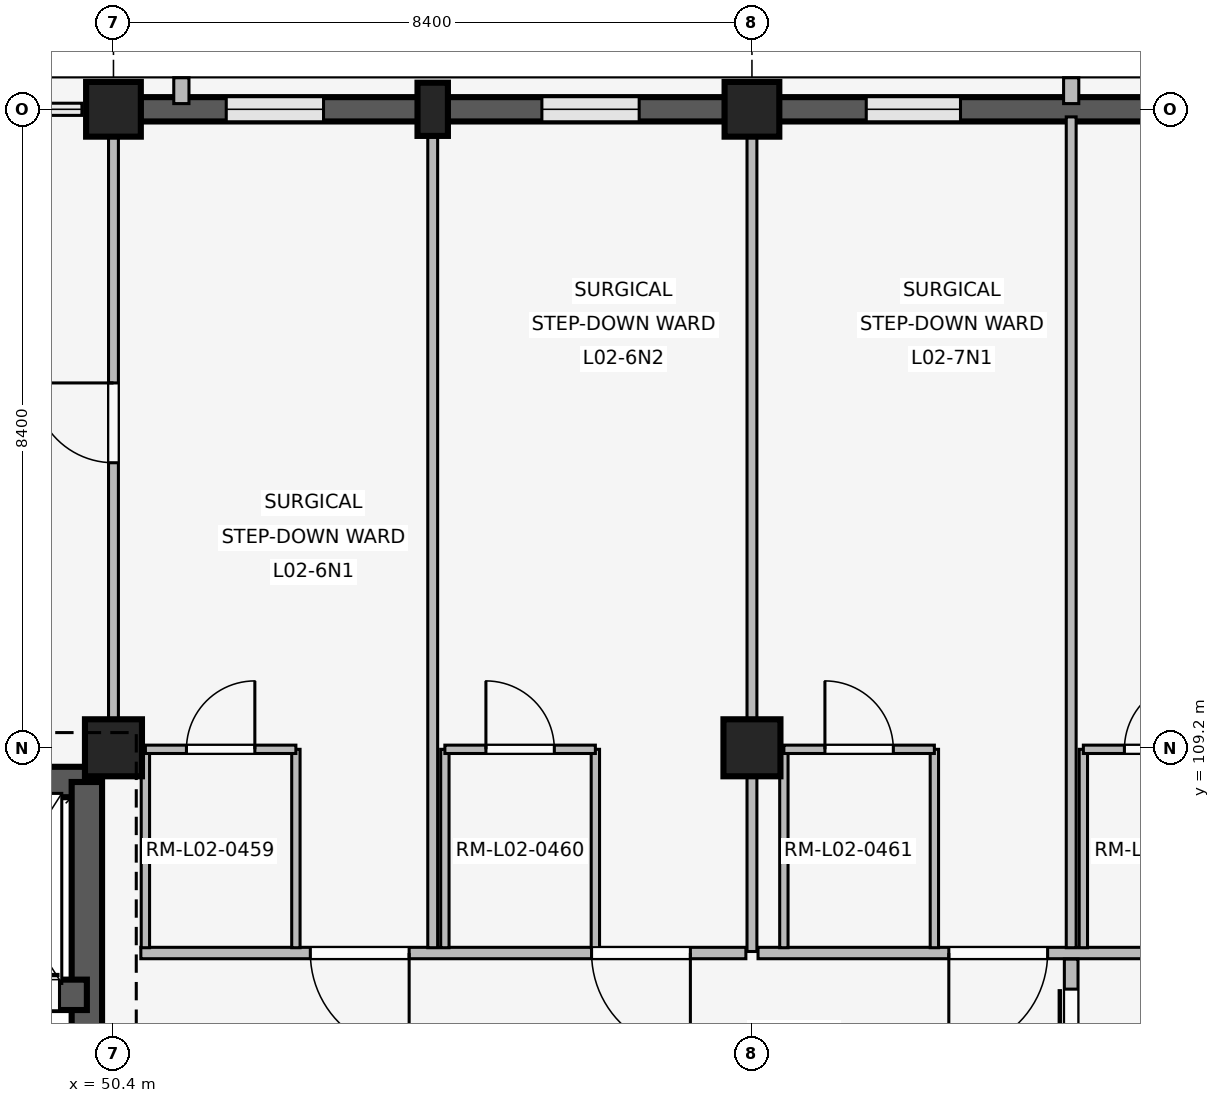
"""IFC4 building model, lengths in metres.
Left out: names, types, materials, properties, quantities, classifications, styles, units other than length and angle.
Written with IfcOpenShell. Run it as: python <this file> out.ifc"""

import sys

from ifc_helpers import new_model, si_unit, direction, frame, frame_2d, origin, origin_2d, place, context, subcontext, project, spatial, rectangle, extrude, element, fill, save


model = new_model("IFC4")
c1 = context("Model", 3, precision=1e-05, world=origin(), true_north=direction((0.0, 1.0)))
c2 = subcontext(c1, "Body", "Model", "MODEL_VIEW")
j1 = project(units=[si_unit("LENGTHUNIT", "METRE"), si_unit("PLANEANGLEUNIT", "RADIAN")], contexts=[c1])
p1 = place(None, origin())
s1 = spatial("IfcSite", under=j1, at=p1, CompositionType="ELEMENT")
p2 = place(p1, origin())
s2 = spatial("IfcBuilding", under=s1, at=p2, CompositionType="ELEMENT")
p3 = place(p2, frame((0.0, 0.0, 8.1)))
s3 = spatial("IfcBuildingStorey", under=s2, at=p3, CompositionType="ELEMENT", Elevation=8.1)
p4 = place(p3, frame((50.4, 109.2, 0.0), z_axis=(0.0, 0.0, 1.0), x_axis=(1.0, 0.0, 0.0)))
e1 = element("IfcColumn", 1, at=p4, inside=s3, PredefinedType="COLUMN", context=c2, shape_type="SweptSolid", body=[
    extrude(rectangle(XDim=0.75, YDim=0.75, at=origin_2d()), origin(), (0.0, 0.0, 1.0), 4.8),
])
p5 = place(p3, frame((50.4, 117.6, 0.0), z_axis=(0.0, 0.0, 1.0), x_axis=(1.0, 0.0, 0.0)))
e2 = element("IfcColumn", 2, at=p5, inside=s3, PredefinedType="COLUMN", context=c2, shape_type="SweptSolid", body=[
    extrude(rectangle(XDim=0.72, YDim=0.72, at=origin_2d()), origin(), (0.0, 0.0, 1.0), 4.8),
])
p6 = place(p3, frame((58.8, 109.2, 0.0), z_axis=(0.0, 0.0, 1.0), x_axis=(1.0, 0.0, 0.0)))
e3 = element("IfcColumn", 3, at=p6, inside=s3, PredefinedType="COLUMN", context=c2, shape_type="SweptSolid", body=[
    extrude(rectangle(XDim=0.75, YDim=0.75, at=origin_2d()), origin(), (0.0, 0.0, 1.0), 4.8),
])
p7 = place(p3, frame((58.8, 117.6, 0.0), z_axis=(0.0, 0.0, 1.0), x_axis=(1.0, 0.0, 0.0)))
e4 = element("IfcColumn", 4, at=p7, inside=s3, PredefinedType="COLUMN", context=c2, shape_type="SweptSolid", body=[
    extrude(rectangle(XDim=0.72, YDim=0.72, at=origin_2d()), origin(), (0.0, 0.0, 1.0), 4.8),
])
p8 = place(p3, frame((54.6, 117.6, 0.0), z_axis=(0.0, 0.0, 1.0), x_axis=(1.0, 0.0, 0.0)))
e5 = element("IfcColumn", 5, at=p8, inside=s3, PredefinedType="PILASTER", context=c2, shape_type="SweptSolid", body=[
    extrude(rectangle(XDim=0.4, YDim=0.7, at=origin_2d()), origin(), (0.0, 0.0, 1.0), 4.8),
])
p9 = place(p3, frame((50.755, 117.6, 0.0), z_axis=(0.0, 0.0, 1.0), x_axis=(1.0, 0.0, 0.0)))
e6 = element("IfcWall", 6, at=p9, inside=s3, PredefinedType="SOLIDWALL", context=c2, shape_type="SweptSolid", body=[
    extrude(rectangle(XDim=7.69, YDim=0.32, at=frame_2d((3.845, 0.0))), origin(), (0.0, 0.0, 1.0), 3.86),
])
p10 = place(p9, frame((1.129, 0.0, 0.85)))
e7 = element("IfcOpeningElement", 7, at=p10, cuts=e6, PredefinedType="OPENING", context=c2, shape_type="SweptSolid", body=[
    extrude(rectangle(XDim=1.28, YDim=1.38, at=frame_2d((0.64, 0.69))), frame((0.0, 0.17, 0.0), z_axis=(0.0, -1.0, 0.0), x_axis=(1.0, 0.0, 0.0)), (0.0, 0.0, 1.0), 0.34),
])
p11 = place(p9, frame((5.281, 0.0, 0.85)))
e8 = element("IfcOpeningElement", 8, at=p11, cuts=e6, PredefinedType="OPENING", context=c2, shape_type="SweptSolid", body=[
    extrude(rectangle(XDim=1.28, YDim=1.38, at=frame_2d((0.64, 0.69))), frame((0.0, 0.17, 0.0), z_axis=(0.0, -1.0, 0.0), x_axis=(1.0, 0.0, 0.0)), (0.0, 0.0, 1.0), 0.34),
])
p12 = place(p3, frame((51.293, 117.675, 0.0), z_axis=(0.0, 0.0, 1.0), x_axis=(0.0, 1.0, 0.0)))
e9 = element("IfcWall", 9, at=p12, inside=s3, PredefinedType="ELEMENTEDWALL", context=c2, shape_type="SweptSolid", body=[
    extrude(rectangle(XDim=0.34, YDim=0.2, at=frame_2d((0.17, 0.0))), origin(), (0.0, 0.0, 1.0), 3.84),
])
p13 = place(p3, frame((59.155, 117.6, 0.0), z_axis=(0.0, 0.0, 1.0), x_axis=(1.0, 0.0, 0.0)))
e10 = element("IfcWall", 10, at=p13, inside=s3, PredefinedType="SOLIDWALL", context=c2, shape_type="SweptSolid", body=[
    extrude(rectangle(XDim=7.69, YDim=0.32, at=frame_2d((3.845, 0.0))), origin(), (0.0, 0.0, 1.0), 3.86),
])
p14 = place(p13, frame((1.149, 0.0, 0.85)))
e11 = element("IfcOpeningElement", 11, at=p14, cuts=e10, PredefinedType="OPENING", context=c2, shape_type="SweptSolid", body=[
    extrude(rectangle(XDim=1.24, YDim=1.34, at=frame_2d((0.62, 0.67))), frame((0.0, 0.17, 0.0), z_axis=(0.0, -1.0, 0.0), x_axis=(1.0, 0.0, 0.0)), (0.0, 0.0, 1.0), 0.34),
])
p15 = place(p13, frame((5.301, 0.0, 0.85)))
e12 = element("IfcOpeningElement", 12, at=p15, cuts=e10, PredefinedType="OPENING", context=c2, shape_type="SweptSolid", body=[
    extrude(rectangle(XDim=1.24, YDim=1.34, at=frame_2d((0.62, 0.67))), frame((0.0, 0.17, 0.0), z_axis=(0.0, -1.0, 0.0), x_axis=(1.0, 0.0, 0.0)), (0.0, 0.0, 1.0), 0.34),
])
p16 = place(p3, frame((63.0, 117.675, 0.0), z_axis=(0.0, 0.0, 1.0), x_axis=(0.0, 1.0, 0.0)))
e13 = element("IfcWall", 13, at=p16, inside=s3, PredefinedType="ELEMENTEDWALL", context=c2, shape_type="SweptSolid", body=[
    extrude(rectangle(XDim=0.34, YDim=0.2, at=frame_2d((0.17, 0.0))), origin(), (0.0, 0.0, 1.0), 3.84),
])
p17 = place(p3, frame((42.55, 108.75, 0.0), z_axis=(0.0, 0.0, 1.0), x_axis=(1.0, 0.0, 0.0)))
e14 = element("IfcWall", 14, at=p17, inside=s3, PredefinedType="SHEAR", context=c2, shape_type="SweptSolid", body=[
    extrude(rectangle(XDim=7.5, YDim=0.4, at=frame_2d((3.75, 0.0))), origin(), (0.0, 0.0, 1.0), 4.52),
])
p18 = place(p3, frame((50.05, 101.2, 0.0), z_axis=(0.0, 0.0, 1.0), x_axis=(0.0, 1.0, 0.0)))
e15 = element("IfcWall", 15, at=p18, inside=s3, PredefinedType="SHEAR", context=c2, shape_type="SweptSolid", body=[
    extrude(rectangle(XDim=7.55, YDim=0.4, at=frame_2d((3.775, 0.0))), origin(), (0.0, 0.0, 1.0), 4.52),
])
p19 = place(p18, frame((2.4, 0.0, 0.0)))
e16 = element("IfcOpeningElement", 16, at=p19, cuts=e15, PredefinedType="OPENING", context=c2, shape_type="SweptSolid", body=[
    extrude(rectangle(XDim=1.2, YDim=2.2, at=frame_2d((0.6, 1.1))), frame((0.0, 0.21, 0.0), z_axis=(0.0, -1.0, 0.0), x_axis=(1.0, 0.0, 0.0)), (0.0, 0.0, 1.0), 0.42),
])
p20 = place(p3, frame((46.25, 105.95, 0.0), z_axis=(0.0, 0.0, 1.0), x_axis=(1.0, 0.0, 0.0)))
e17 = element("IfcWall", 17, at=p20, inside=s3, PredefinedType="SHEAR", context=c2, shape_type="SweptSolid", body=[
    extrude(rectangle(XDim=3.8, YDim=0.4, at=frame_2d((1.9, 0.0))), origin(), (0.0, 0.0, 1.0), 4.52),
])
p21 = place(p20, frame((0.32, 0.0, 0.0)))
e18 = element("IfcOpeningElement", 18, at=p21, cuts=e17, PredefinedType="OPENING", context=c2, shape_type="SweptSolid", body=[
    extrude(rectangle(XDim=1.35, YDim=2.25, at=frame_2d((0.675, 1.125))), frame((0.0, 0.21, 0.0), z_axis=(0.0, -1.0, 0.0), x_axis=(1.0, 0.0, 0.0)), (0.0, 0.0, 1.0), 0.42),
])
p22 = place(p20, frame((2.04, 0.0, 0.0)))
e19 = element("IfcOpeningElement", 19, at=p22, cuts=e17, PredefinedType="OPENING", context=c2, shape_type="SweptSolid", body=[
    extrude(rectangle(XDim=1.4, YDim=2.25, at=frame_2d((0.7, 1.125))), frame((0.0, 0.21, 0.0), z_axis=(0.0, -1.0, 0.0), x_axis=(1.0, 0.0, 0.0)), (0.0, 0.0, 1.0), 0.42),
])
p23 = place(p3, frame((50.4, 109.55, 0.0), z_axis=(0.0, 0.0, 1.0), x_axis=(0.0, 1.0, 0.0)))
e20 = element("IfcWall", 20, at=p23, inside=s3, PredefinedType="PARTITIONING", context=c2, shape_type="SweptSolid", body=[
    extrude(rectangle(XDim=7.91, YDim=0.13, at=frame_2d((3.955, 0.0))), origin(), (0.0, 0.0, 1.0), 3.84),
])
p24 = place(p23, frame((3.4, 0.0, 0.0)))
e21 = element("IfcOpeningElement", 21, at=p24, cuts=e20, PredefinedType="OPENING", context=c2, shape_type="SweptSolid", body=[
    extrude(rectangle(XDim=1.05, YDim=2.2, at=frame_2d((0.525, 1.1))), frame((0.0, 0.075, 0.0), z_axis=(0.0, -1.0, 0.0), x_axis=(1.0, 0.0, 0.0)), (0.0, 0.0, 1.0), 0.15),
])
p25 = place(p3, frame((58.72, 106.5, 0.0), z_axis=(0.0, 0.0, 1.0), x_axis=(-1.0, 0.0, 0.0)))
e22 = element("IfcWall", 22, at=p25, inside=s3, PredefinedType="PARTITIONING", context=c2, shape_type="SweptSolid", body=[
    extrude(rectangle(XDim=7.96, YDim=0.15, at=frame_2d((3.98, 0.0))), origin(), (0.0, 0.0, 1.0), 3.84),
])
p26 = place(p25, frame((0.73, 0.0, 0.0)))
e23 = element("IfcOpeningElement", 23, at=p26, cuts=e22, PredefinedType="OPENING", context=c2, shape_type="SweptSolid", body=[
    extrude(rectangle(XDim=1.3, YDim=2.25, at=frame_2d((0.65, 1.125))), frame((0.0, 0.085, 0.0), z_axis=(0.0, -1.0, 0.0), x_axis=(1.0, 0.0, 0.0)), (0.0, 0.0, 1.0), 0.17),
])
p27 = place(p25, frame((4.43, 0.0, 0.0)))
e24 = element("IfcOpeningElement", 24, at=p27, cuts=e22, PredefinedType="OPENING", context=c2, shape_type="SweptSolid", body=[
    extrude(rectangle(XDim=1.3, YDim=2.25, at=frame_2d((0.65, 1.125))), frame((0.0, 0.085, 0.0), z_axis=(0.0, -1.0, 0.0), x_axis=(1.0, 0.0, 0.0)), (0.0, 0.0, 1.0), 0.17),
])
p28 = place(p3, frame((54.6, 106.57, 0.0), z_axis=(0.0, 0.0, 1.0), x_axis=(0.0, 1.0, 0.0)))
e25 = element("IfcWall", 25, at=p28, inside=s3, PredefinedType="PARTITIONING", context=c2, shape_type="SweptSolid", body=[
    extrude(rectangle(XDim=10.93, YDim=0.13, at=frame_2d((5.465, 0.0))), origin(), (0.0, 0.0, 1.0), 3.84),
])
for number, where, z_axis, x_axis in (
    (26, (50.82, 106.57, 0.0), (0.0, 0.0, 1.0), (0.0, 1.0, 0.0)),
    (27, (52.8, 106.57, 0.0), (0.0, 0.0, 1.0), (0.0, 1.0, 0.0)),
):
    element("IfcWall", number, at=place(p3, frame(where, z_axis=z_axis, x_axis=x_axis)), inside=s3, PredefinedType="PARTITIONING", context=c2, shape_type="SweptSolid", body=[
        extrude(rectangle(XDim=2.61, YDim=0.11, at=frame_2d((1.305, 0.0))), origin(), (0.0, 0.0, 1.0), 3.84),
    ])
p29 = place(p3, frame((50.82, 109.18, 0.0), z_axis=(0.0, 0.0, 1.0), x_axis=(1.0, 0.0, 0.0)))
e28 = element("IfcWall", 28, at=p29, inside=s3, PredefinedType="PARTITIONING", context=c2, shape_type="SweptSolid", body=[
    extrude(rectangle(XDim=1.98, YDim=0.11, at=frame_2d((0.99, 0.0))), origin(), (0.0, 0.0, 1.0), 3.84),
])
p30 = place(p29, frame((0.54, 0.0, 0.0)))
e29 = element("IfcOpeningElement", 29, at=p30, cuts=e28, PredefinedType="OPENING", context=c2, shape_type="SweptSolid", body=[
    extrude(rectangle(XDim=0.9, YDim=2.1, at=frame_2d((0.45, 1.05))), frame((0.0, 0.065, 0.0), z_axis=(0.0, -1.0, 0.0), x_axis=(1.0, 0.0, 0.0)), (0.0, 0.0, 1.0), 0.13),
])
for number, where, z_axis, x_axis in (
    (30, (54.76, 106.57, 0.0), (0.0, 0.0, 1.0), (0.0, 1.0, 0.0)),
    (31, (56.74, 106.57, 0.0), (0.0, 0.0, 1.0), (0.0, 1.0, 0.0)),
):
    element("IfcWall", number, at=place(p3, frame(where, z_axis=z_axis, x_axis=x_axis)), inside=s3, PredefinedType="PARTITIONING", context=c2, shape_type="SweptSolid", body=[
        extrude(rectangle(XDim=2.61, YDim=0.11, at=frame_2d((1.305, 0.0))), origin(), (0.0, 0.0, 1.0), 3.84),
    ])
p31 = place(p3, frame((54.76, 109.18, 0.0), z_axis=(0.0, 0.0, 1.0), x_axis=(1.0, 0.0, 0.0)))
e32 = element("IfcWall", 32, at=p31, inside=s3, PredefinedType="PARTITIONING", context=c2, shape_type="SweptSolid", body=[
    extrude(rectangle(XDim=1.98, YDim=0.11, at=frame_2d((0.99, 0.0))), origin(), (0.0, 0.0, 1.0), 3.84),
])
p32 = place(p31, frame((0.54, 0.0, 0.0)))
e33 = element("IfcOpeningElement", 33, at=p32, cuts=e32, PredefinedType="OPENING", context=c2, shape_type="SweptSolid", body=[
    extrude(rectangle(XDim=0.9, YDim=2.1, at=frame_2d((0.45, 1.05))), frame((0.0, 0.065, 0.0), z_axis=(0.0, -1.0, 0.0), x_axis=(1.0, 0.0, 0.0)), (0.0, 0.0, 1.0), 0.13),
])
p33 = place(p3, frame((58.8, 106.52, 0.0), z_axis=(0.0, 0.0, 1.0), x_axis=(0.0, 1.0, 0.0)))
e34 = element("IfcWall", 34, at=p33, inside=s3, PredefinedType="PARTITIONING", context=c2, shape_type="SweptSolid", body=[
    extrude(rectangle(XDim=10.94, YDim=0.13, at=frame_2d((5.47, 0.0))), origin(), (0.0, 0.0, 1.0), 3.84),
])
p34 = place(p3, frame((67.12, 106.5, 0.0), z_axis=(0.0, 0.0, 1.0), x_axis=(-1.0, 0.0, 0.0)))
e35 = element("IfcWall", 35, at=p34, inside=s3, PredefinedType="PARTITIONING", context=c2, shape_type="SweptSolid", body=[
    extrude(rectangle(XDim=8.24, YDim=0.15, at=frame_2d((4.12, 0.0))), origin(), (0.0, 0.0, 1.0), 3.84),
])
p35 = place(p34, frame((0.73, 0.0, 0.0)))
e36 = element("IfcOpeningElement", 36, at=p35, cuts=e35, PredefinedType="OPENING", context=c2, shape_type="SweptSolid", body=[
    extrude(rectangle(XDim=1.3, YDim=2.25, at=frame_2d((0.65, 1.125))), frame((0.0, 0.085, 0.0), z_axis=(0.0, -1.0, 0.0), x_axis=(1.0, 0.0, 0.0)), (0.0, 0.0, 1.0), 0.17),
])
p36 = place(p34, frame((4.43, 0.0, 0.0)))
e37 = element("IfcOpeningElement", 37, at=p36, cuts=e35, PredefinedType="OPENING", context=c2, shape_type="SweptSolid", body=[
    extrude(rectangle(XDim=1.3, YDim=2.25, at=frame_2d((0.65, 1.125))), frame((0.0, 0.085, 0.0), z_axis=(0.0, -1.0, 0.0), x_axis=(1.0, 0.0, 0.0)), (0.0, 0.0, 1.0), 0.17),
])
p37 = place(p3, frame((63.0, 106.57, 0.0), z_axis=(0.0, 0.0, 1.0), x_axis=(0.0, 1.0, 0.0)))
e38 = element("IfcWall", 38, at=p37, inside=s3, PredefinedType="PARTITIONING", context=c2, shape_type="SweptSolid", body=[
    extrude(rectangle(XDim=10.93, YDim=0.13, at=frame_2d((5.465, 0.0))), origin(), (0.0, 0.0, 1.0), 3.84),
])
for number, where, z_axis, x_axis in (
    (39, (59.22, 106.57, 0.0), (0.0, 0.0, 1.0), (0.0, 1.0, 0.0)),
    (40, (61.2, 106.57, 0.0), (0.0, 0.0, 1.0), (0.0, 1.0, 0.0)),
):
    element("IfcWall", number, at=place(p3, frame(where, z_axis=z_axis, x_axis=x_axis)), inside=s3, PredefinedType="PARTITIONING", context=c2, shape_type="SweptSolid", body=[
        extrude(rectangle(XDim=2.61, YDim=0.11, at=frame_2d((1.305, 0.0))), origin(), (0.0, 0.0, 1.0), 3.84),
    ])
p38 = place(p3, frame((59.22, 109.18, 0.0), z_axis=(0.0, 0.0, 1.0), x_axis=(1.0, 0.0, 0.0)))
e41 = element("IfcWall", 41, at=p38, inside=s3, PredefinedType="PARTITIONING", context=c2, shape_type="SweptSolid", body=[
    extrude(rectangle(XDim=1.98, YDim=0.11, at=frame_2d((0.99, 0.0))), origin(), (0.0, 0.0, 1.0), 3.84),
])
p39 = place(p38, frame((0.54, 0.0, 0.0)))
e42 = element("IfcOpeningElement", 42, at=p39, cuts=e41, PredefinedType="OPENING", context=c2, shape_type="SweptSolid", body=[
    extrude(rectangle(XDim=0.9, YDim=2.1, at=frame_2d((0.45, 1.05))), frame((0.0, 0.065, 0.0), z_axis=(0.0, -1.0, 0.0), x_axis=(1.0, 0.0, 0.0)), (0.0, 0.0, 1.0), 0.13),
])
p40 = place(p3, frame((63.16, 106.57, 0.0), z_axis=(0.0, 0.0, 1.0), x_axis=(0.0, 1.0, 0.0)))
e43 = element("IfcWall", 43, at=p40, inside=s3, PredefinedType="PARTITIONING", context=c2, shape_type="SweptSolid", body=[
    extrude(rectangle(XDim=2.61, YDim=0.11, at=frame_2d((1.305, 0.0))), origin(), (0.0, 0.0, 1.0), 3.84),
])
p41 = place(p3, frame((63.16, 109.18, 0.0), z_axis=(0.0, 0.0, 1.0), x_axis=(1.0, 0.0, 0.0)))
e44 = element("IfcWall", 44, at=p41, inside=s3, PredefinedType="PARTITIONING", context=c2, shape_type="SweptSolid", body=[
    extrude(rectangle(XDim=1.98, YDim=0.11, at=frame_2d((0.99, 0.0))), origin(), (0.0, 0.0, 1.0), 3.84),
])
p42 = place(p41, frame((0.54, 0.0, 0.0)))
e45 = element("IfcOpeningElement", 45, at=p42, cuts=e44, PredefinedType="OPENING", context=c2, shape_type="SweptSolid", body=[
    extrude(rectangle(XDim=0.9, YDim=2.1, at=frame_2d((0.45, 1.05))), frame((0.0, 0.065, 0.0), z_axis=(0.0, -1.0, 0.0), x_axis=(1.0, 0.0, 0.0)), (0.0, 0.0, 1.0), 0.13),
])
p43 = place(p3, frame((63.0, 103.58, 0.0), z_axis=(0.0, 0.0, 1.0), x_axis=(0.0, 1.0, 0.0)))
e46 = element("IfcWall", 46, at=p43, inside=s3, PredefinedType="PARTITIONING", context=c2, shape_type="SweptSolid", body=[
    extrude(rectangle(XDim=2.84, YDim=0.18, at=frame_2d((1.42, 0.0))), origin(), (0.0, 0.0, 1.0), 3.84),
])
p44 = place(p43, frame((0.395, 0.0, 0.0)))
e47 = element("IfcOpeningElement", 47, at=p44, cuts=e46, PredefinedType="OPENING", context=c2, shape_type="SweptSolid", body=[
    extrude(rectangle(XDim=2.05, YDim=2.35, at=frame_2d((1.025, 1.175))), frame((0.0, 0.1, 0.0), z_axis=(0.0, -1.0, 0.0), x_axis=(1.0, 0.0, 0.0)), (0.0, 0.0, 1.0), 0.2),
])
p45 = place(p10, origin())
e48 = element("IfcWindow", 48, at=p45, inside=s3, PartitioningType="SINGLE_PANEL", PredefinedType="WINDOW", context=c2, shape_type="SweptSolid", body=[
    extrude(rectangle(XDim=1.28, YDim=1.38, at=frame_2d((0.64, 0.69))), frame((0.0, 0.03, 0.0), z_axis=(0.0, -1.0, 0.0), x_axis=(1.0, 0.0, 0.0)), (0.0, 0.0, 1.0), 0.06),
])
fill(e7, e48)
p46 = place(p11, origin())
e49 = element("IfcWindow", 49, at=p46, inside=s3, PartitioningType="SINGLE_PANEL", PredefinedType="WINDOW", context=c2, shape_type="SweptSolid", body=[
    extrude(rectangle(XDim=1.28, YDim=1.38, at=frame_2d((0.64, 0.69))), frame((0.0, 0.03, 0.0), z_axis=(0.0, -1.0, 0.0), x_axis=(1.0, 0.0, 0.0)), (0.0, 0.0, 1.0), 0.06),
])
fill(e8, e49)
p47 = place(p14, origin())
e50 = element("IfcWindow", 50, at=p47, inside=s3, PartitioningType="SINGLE_PANEL", PredefinedType="WINDOW", context=c2, shape_type="SweptSolid", body=[
    extrude(rectangle(XDim=1.24, YDim=1.34, at=frame_2d((0.62, 0.67))), frame((0.0, 0.03, 0.0), z_axis=(0.0, -1.0, 0.0), x_axis=(1.0, 0.0, 0.0)), (0.0, 0.0, 1.0), 0.06),
])
fill(e11, e50)
p48 = place(p22, origin())
e51 = element("IfcDoor", 51, at=p48, inside=s3, OperationType="SLIDING_TO_LEFT", PredefinedType="DOOR", context=c2, shape_type="SweptSolid", body=[
    extrude(rectangle(XDim=1.4, YDim=2.25, at=frame_2d((0.7, 1.125))), frame((0.0, 0.025, 0.0), z_axis=(0.0, -1.0, 0.0), x_axis=(1.0, 0.0, 0.0)), (0.0, 0.0, 1.0), 0.05),
])
fill(e19, e51)
p49 = place(p24, origin())
e52 = element("IfcDoor", 52, at=p49, inside=s3, OperationType="SINGLE_SWING_RIGHT", PredefinedType="DOOR", context=c2, shape_type="SweptSolid", body=[
    extrude(rectangle(XDim=1.05, YDim=2.2, at=frame_2d((0.525, 1.1))), frame((0.0, 0.025, 0.0), z_axis=(0.0, -1.0, 0.0), x_axis=(1.0, 0.0, 0.0)), (0.0, 0.0, 1.0), 0.05),
])
fill(e21, e52)
p50 = place(p26, origin())
e53 = element("IfcDoor", 53, at=p50, inside=s3, OperationType="SINGLE_SWING_LEFT", PredefinedType="DOOR", context=c2, shape_type="SweptSolid", body=[
    extrude(rectangle(XDim=1.3, YDim=2.25, at=frame_2d((0.65, 1.125))), frame((0.0, 0.025, 0.0), z_axis=(0.0, -1.0, 0.0), x_axis=(1.0, 0.0, 0.0)), (0.0, 0.0, 1.0), 0.05),
])
fill(e23, e53)
p51 = place(p27, origin())
e54 = element("IfcDoor", 54, at=p51, inside=s3, OperationType="SINGLE_SWING_LEFT", PredefinedType="DOOR", context=c2, shape_type="SweptSolid", body=[
    extrude(rectangle(XDim=1.3, YDim=2.25, at=frame_2d((0.65, 1.125))), frame((0.0, 0.025, 0.0), z_axis=(0.0, -1.0, 0.0), x_axis=(1.0, 0.0, 0.0)), (0.0, 0.0, 1.0), 0.05),
])
fill(e24, e54)
p52 = place(p30, origin())
e55 = element("IfcDoor", 55, at=p52, inside=s3, OperationType="SINGLE_SWING_RIGHT", PredefinedType="DOOR", context=c2, shape_type="SweptSolid", body=[
    extrude(rectangle(XDim=0.9, YDim=2.1, at=frame_2d((0.45, 1.05))), frame((0.0, 0.025, 0.0), z_axis=(0.0, -1.0, 0.0), x_axis=(1.0, 0.0, 0.0)), (0.0, 0.0, 1.0), 0.05),
])
fill(e29, e55)
p53 = place(p32, origin())
e56 = element("IfcDoor", 56, at=p53, inside=s3, OperationType="SINGLE_SWING_LEFT", PredefinedType="DOOR", context=c2, shape_type="SweptSolid", body=[
    extrude(rectangle(XDim=0.9, YDim=2.1, at=frame_2d((0.45, 1.05))), frame((0.0, 0.025, 0.0), z_axis=(0.0, -1.0, 0.0), x_axis=(1.0, 0.0, 0.0)), (0.0, 0.0, 1.0), 0.05),
])
fill(e33, e56)
p54 = place(p36, origin())
e57 = element("IfcDoor", 57, at=p54, inside=s3, OperationType="SINGLE_SWING_RIGHT", PredefinedType="DOOR", context=c2, shape_type="SweptSolid", body=[
    extrude(rectangle(XDim=1.3, YDim=2.25, at=frame_2d((0.65, 1.125))), frame((0.0, 0.025, 0.0), z_axis=(0.0, -1.0, 0.0), x_axis=(1.0, 0.0, 0.0)), (0.0, 0.0, 1.0), 0.05),
])
fill(e37, e57)
p55 = place(p39, origin())
e58 = element("IfcDoor", 58, at=p55, inside=s3, OperationType="SINGLE_SWING_LEFT", PredefinedType="DOOR", context=c2, shape_type="SweptSolid", body=[
    extrude(rectangle(XDim=0.9, YDim=2.1, at=frame_2d((0.45, 1.05))), frame((0.0, 0.025, 0.0), z_axis=(0.0, -1.0, 0.0), x_axis=(1.0, 0.0, 0.0)), (0.0, 0.0, 1.0), 0.05),
])
fill(e42, e58)
p56 = place(p42, origin())
e59 = element("IfcDoor", 59, at=p56, inside=s3, OperationType="SINGLE_SWING_RIGHT", PredefinedType="DOOR", context=c2, shape_type="SweptSolid", body=[
    extrude(rectangle(XDim=0.9, YDim=2.1, at=frame_2d((0.45, 1.05))), frame((0.0, 0.025, 0.0), z_axis=(0.0, -1.0, 0.0), x_axis=(1.0, 0.0, 0.0)), (0.0, 0.0, 1.0), 0.05),
])
fill(e45, e59)
p57 = place(p44, origin())
e60 = element("IfcDoor", 60, at=p57, inside=s3, OperationType="SLIDING_TO_LEFT", PredefinedType="DOOR", context=c2, shape_type="SweptSolid", body=[
    extrude(rectangle(XDim=2.05, YDim=2.35, at=frame_2d((1.025, 1.175))), frame((0.0, 0.025, 0.0), z_axis=(0.0, -1.0, 0.0), x_axis=(1.0, 0.0, 0.0)), (0.0, 0.0, 1.0), 0.05),
])
fill(e47, e60)
save(model, sys.argv[1])
